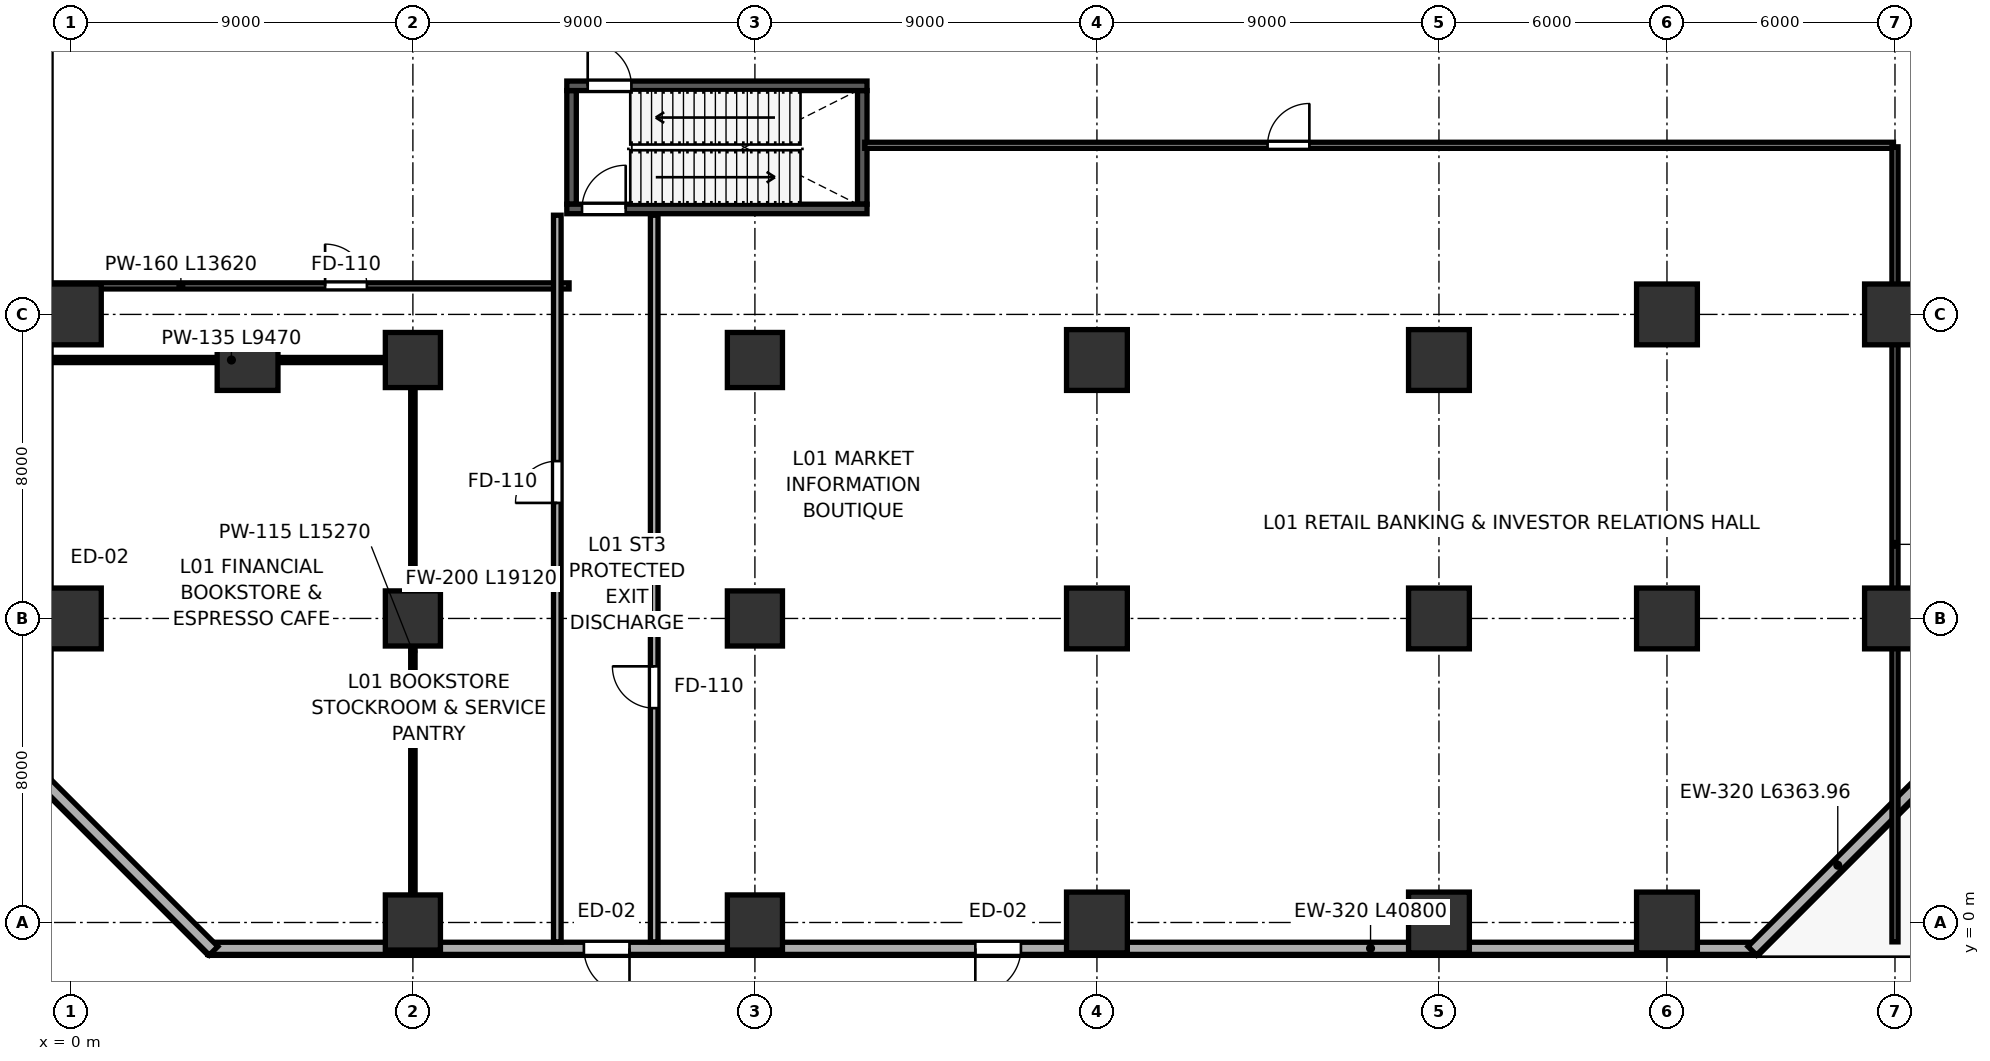
"""IFC4 building model, lengths in metres.
Left out: names, types, materials, properties, quantities, classifications, styles, units other than length and angle.
Written with IfcOpenShell. Run it as: python <this file> out.ifc"""

import sys

from ifc_helpers import new_model, si_unit, direction, frame, frame_2d, origin, origin_2d, place, context, subcontext, project, spatial, rectangle, extrude, source, transform, mapped, element, fill, save


model = new_model("IFC4")
c1 = context("Model", 3, precision=1e-05, world=origin(), true_north=direction((0.0, 1.0)))
c2 = subcontext(c1, "Body", "Model", "MODEL_VIEW")
j1 = project(units=[si_unit("LENGTHUNIT", "METRE"), si_unit("PLANEANGLEUNIT", "RADIAN")], contexts=[c1])
p1 = place(None, origin())
s1 = spatial("IfcSite", under=j1, at=p1, CompositionType="ELEMENT")
p2 = place(p1, origin())
s2 = spatial("IfcBuilding", under=s1, at=p2, CompositionType="ELEMENT")
p3 = place(p2, origin())
s3 = spatial("IfcBuildingStorey", under=s2, at=p3, CompositionType="ELEMENT", Elevation=0.0)
m1 = source(origin(), c2, "Body", "SweptSolid", [
    extrude(rectangle(XDim=1.6, YDim=1.6, at=origin_2d()), origin(), (0.0, 0.0, 1.0), 5.999),
])
for number, where, z_axis, x_axis in (
    (1, (0.0, 8.0, 0.001), (0.0, 0.0, 1.0), (1.0, 0.0, 0.0)),
    (2, (0.0, 16.0, 0.001), (0.0, 0.0, 1.0), (1.0, 0.0, 0.0)),
):
    element("IfcColumn", number, at=place(p3, frame(where, z_axis=z_axis, x_axis=x_axis)), inside=s3, PredefinedType="COLUMN", context=c2, shape_type="MappedRepresentation", body=[
        mapped(m1, transform((0.0, 0.0, 0.0), scale=1.0)),
    ])
m2 = source(origin(), c2, "Body", "SweptSolid", [
    extrude(rectangle(XDim=1.45, YDim=1.45, at=origin_2d()), origin(), (0.0, 0.0, 1.0), 5.999),
])
p4 = place(p3, frame((9.0, 0.0, 0.001), z_axis=(0.0, 0.0, 1.0), x_axis=(1.0, 0.0, 0.0)))
e3 = element("IfcColumn", 3, at=p4, inside=s3, PredefinedType="COLUMN", context=c2, shape_type="MappedRepresentation", body=[
    mapped(m2, transform((0.0, 0.0, 0.0), scale=1.0)),
])
m3 = source(origin(), c2, "Body", "SweptSolid", [
    extrude(rectangle(XDim=1.45, YDim=1.45, at=origin_2d()), origin(), (0.0, 0.0, 1.0), 5.999),
])
for number, where, z_axis, x_axis in (
    (4, (9.0, 8.0, 0.001), (0.0, 0.0, 1.0), (1.0, 0.0, 0.0)),
    (5, (9.0, 14.8, 0.001), (0.0, 0.0, 1.0), (1.0, 0.0, 0.0)),
):
    element("IfcColumn", number, at=place(p3, frame(where, z_axis=z_axis, x_axis=x_axis)), inside=s3, PredefinedType="COLUMN", context=c2, shape_type="MappedRepresentation", body=[
        mapped(m3, transform((0.0, 0.0, 0.0), scale=1.0)),
    ])
p5 = place(p3, frame((18.0, 0.0, 0.001), z_axis=(0.0, 0.0, 1.0), x_axis=(1.0, 0.0, 0.0)))
e6 = element("IfcColumn", 6, at=p5, inside=s3, PredefinedType="COLUMN", context=c2, shape_type="MappedRepresentation", body=[
    mapped(m2, transform((0.0, 0.0, 0.0), scale=1.0)),
])
for number, where, z_axis, x_axis in (
    (7, (18.0, 8.0, 0.001), (0.0, 0.0, 1.0), (1.0, 0.0, 0.0)),
    (8, (18.0, 14.8, 0.001), (0.0, 0.0, 1.0), (1.0, 0.0, 0.0)),
):
    element("IfcColumn", number, at=place(p3, frame(where, z_axis=z_axis, x_axis=x_axis)), inside=s3, PredefinedType="COLUMN", context=c2, shape_type="MappedRepresentation", body=[
        mapped(m3, transform((0.0, 0.0, 0.0), scale=1.0)),
    ])
p6 = place(p3, frame((27.0, 0.0, 0.001), z_axis=(0.0, 0.0, 1.0), x_axis=(1.0, 0.0, 0.0)))
e9 = element("IfcColumn", 9, at=p6, inside=s3, PredefinedType="COLUMN", context=c2, shape_type="MappedRepresentation", body=[
    mapped(m1, transform((0.0, 0.0, 0.0), scale=1.0)),
])
m4 = source(origin(), c2, "Body", "SweptSolid", [
    extrude(rectangle(XDim=1.6, YDim=1.6, at=origin_2d()), origin(), (0.0, 0.0, 1.0), 5.999),
])
for number, where, z_axis, x_axis in (
    (10, (27.0, 8.0, 0.001), (0.0, 0.0, 1.0), (1.0, 0.0, 0.0)),
    (11, (27.0, 14.8, 0.001), (0.0, 0.0, 1.0), (1.0, 0.0, 0.0)),
):
    element("IfcColumn", number, at=place(p3, frame(where, z_axis=z_axis, x_axis=x_axis)), inside=s3, PredefinedType="COLUMN", context=c2, shape_type="MappedRepresentation", body=[
        mapped(m4, transform((0.0, 0.0, 0.0), scale=1.0)),
    ])
p7 = place(p3, frame((36.0, 0.0, 0.001), z_axis=(0.0, 0.0, 1.0), x_axis=(1.0, 0.0, 0.0)))
e12 = element("IfcColumn", 12, at=p7, inside=s3, PredefinedType="COLUMN", context=c2, shape_type="MappedRepresentation", body=[
    mapped(m1, transform((0.0, 0.0, 0.0), scale=1.0)),
])
for number, where, z_axis, x_axis in (
    (13, (36.0, 8.0, 0.001), (0.0, 0.0, 1.0), (1.0, 0.0, 0.0)),
    (14, (36.0, 14.8, 0.001), (0.0, 0.0, 1.0), (1.0, 0.0, 0.0)),
):
    element("IfcColumn", number, at=place(p3, frame(where, z_axis=z_axis, x_axis=x_axis)), inside=s3, PredefinedType="COLUMN", context=c2, shape_type="MappedRepresentation", body=[
        mapped(m4, transform((0.0, 0.0, 0.0), scale=1.0)),
    ])
p8 = place(p3, frame((42.0, 0.0, 0.001), z_axis=(0.0, 0.0, 1.0), x_axis=(1.0, 0.0, 0.0)))
e15 = element("IfcColumn", 15, at=p8, inside=s3, PredefinedType="COLUMN", context=c2, shape_type="MappedRepresentation", body=[
    mapped(m1, transform((0.0, 0.0, 0.0), scale=1.0)),
])
for number, where, z_axis, x_axis in (
    (16, (42.0, 8.0, 0.001), (0.0, 0.0, 1.0), (1.0, 0.0, 0.0)),
    (17, (42.0, 16.0, 0.001), (0.0, 0.0, 1.0), (1.0, 0.0, 0.0)),
):
    element("IfcColumn", number, at=place(p3, frame(where, z_axis=z_axis, x_axis=x_axis)), inside=s3, PredefinedType="COLUMN", context=c2, shape_type="MappedRepresentation", body=[
        mapped(m4, transform((0.0, 0.0, 0.0), scale=1.0)),
    ])
for number, where, z_axis, x_axis in (
    (18, (48.0, 8.0, 0.001), (0.0, 0.0, 1.0), (1.0, 0.0, 0.0)),
    (19, (48.0, 16.0, 0.001), (0.0, 0.0, 1.0), (1.0, 0.0, 0.0)),
):
    element("IfcColumn", number, at=place(p3, frame(where, z_axis=z_axis, x_axis=x_axis)), inside=s3, PredefinedType="COLUMN", context=c2, shape_type="MappedRepresentation", body=[
        mapped(m1, transform((0.0, 0.0, 0.0), scale=1.0)),
    ])
p9 = place(p3, frame((4.65, 14.8, 0.001), z_axis=(0.0, 0.0, 1.0), x_axis=(1.0, 0.0, 0.0)))
e20 = element("IfcColumn", 20, at=p9, inside=s3, PredefinedType="COLUMN", context=c2, shape_type="MappedRepresentation", body=[
    mapped(m4, transform((0.0, 0.0, 0.0), scale=1.0)),
])
p10 = place(p3, frame((44.4, -0.68, 0.0), z_axis=(0.0, 0.0, 1.0), x_axis=(-1.0, 0.0, 0.0)))
e21 = element("IfcWall", 21, at=p10, inside=s3, PredefinedType="SOLIDWALL", context=c2, shape_type="SweptSolid", body=[
    extrude(rectangle(XDim=40.8, YDim=0.32, at=frame_2d((20.4, 0.0))), origin(), (0.0, 0.0, 1.0), 5.74),
])
p11 = place(p10, frame((29.7, 0.0, 0.0)))
e22 = element("IfcOpeningElement", 22, at=p11, cuts=e21, PredefinedType="OPENING", context=c2, shape_type="SweptSolid", body=[
    extrude(rectangle(XDim=1.2, YDim=2.2, at=frame_2d((0.6, 1.1))), frame((0.0, 0.17, 0.0), z_axis=(0.0, -1.0, 0.0), x_axis=(1.0, 0.0, 0.0)), (0.0, 0.0, 1.0), 0.34),
])
p12 = place(p10, frame((19.4, 0.0, 0.0)))
e23 = element("IfcOpeningElement", 23, at=p12, cuts=e21, PredefinedType="OPENING", context=c2, shape_type="SweptSolid", body=[
    extrude(rectangle(XDim=1.2, YDim=2.2, at=frame_2d((0.6, 1.1))), frame((0.0, 0.17, 0.0), z_axis=(0.0, -1.0, 0.0), x_axis=(1.0, 0.0, 0.0)), (0.0, 0.0, 1.0), 0.34),
])
for number, where, z_axis, x_axis in (
    (24, (44.244, -0.744, 0.0), (0.0, 0.0, 1.0), (0.707, 0.707, 0.0)),
    (25, (-0.744, 3.756, 0.0), (0.0, 0.0, 1.0), (0.707, -0.707, 0.0)),
):
    element("IfcWall", number, at=place(p3, frame(where, z_axis=z_axis, x_axis=x_axis)), inside=s3, PredefinedType="SOLIDWALL", context=c2, shape_type="SweptSolid", body=[
        extrude(rectangle(XDim=6.364, YDim=0.32, at=frame_2d((3.182, 0.0))), origin(), (0.0, 0.0, 1.0), 5.74),
    ])
for number, where, z_axis, x_axis in (
    (26, (13.175, 18.9, 0.0), (0.0, 0.0, 1.0), (0.0, 1.0, 0.0)),
    (27, (20.825, 18.9, 0.0), (0.0, 0.0, 1.0), (0.0, 1.0, 0.0)),
):
    element("IfcWall", number, at=place(p3, frame(where, z_axis=z_axis, x_axis=x_axis)), inside=s3, PredefinedType="SHEAR", context=c2, shape_type="SweptSolid", body=[
        extrude(rectangle(XDim=2.99, YDim=0.25, at=frame_2d((1.495, 0.0))), origin(), (0.0, 0.0, 1.0), 5.74),
    ])
p13 = place(p3, frame((13.05, 18.775, 0.0), z_axis=(0.0, 0.0, 1.0), x_axis=(1.0, 0.0, 0.0)))
e28 = element("IfcWall", 28, at=p13, inside=s3, PredefinedType="SHEAR", context=c2, shape_type="SweptSolid", body=[
    extrude(rectangle(XDim=7.9, YDim=0.25, at=frame_2d((3.95, 0.0))), origin(), (0.0, 0.0, 1.0), 5.74),
])
p14 = place(p13, frame((0.4, 0.0, 0.0)))
e29 = element("IfcOpeningElement", 29, at=p14, cuts=e28, PredefinedType="OPENING", context=c2, shape_type="SweptSolid", body=[
    extrude(rectangle(XDim=1.15, YDim=2.2, at=frame_2d((0.575, 1.1))), frame((0.0, 0.135, 0.0), z_axis=(0.0, -1.0, 0.0), x_axis=(1.0, 0.0, 0.0)), (0.0, 0.0, 1.0), 0.27),
])
p15 = place(p3, frame((13.05, 22.015, 0.0), z_axis=(0.0, 0.0, 1.0), x_axis=(1.0, 0.0, 0.0)))
e30 = element("IfcWall", 30, at=p15, inside=s3, PredefinedType="SHEAR", context=c2, shape_type="SweptSolid", body=[
    extrude(rectangle(XDim=7.9, YDim=0.25, at=frame_2d((3.95, 0.0))), origin(), (0.0, 0.0, 1.0), 5.74),
])
p16 = place(p15, frame((0.55, 0.0, 0.0)))
e31 = element("IfcOpeningElement", 31, at=p16, cuts=e30, PredefinedType="OPENING", context=c2, shape_type="SweptSolid", body=[
    extrude(rectangle(XDim=1.15, YDim=2.2, at=frame_2d((0.575, 1.1))), frame((0.0, 0.135, 0.0), z_axis=(0.0, -1.0, 0.0), x_axis=(1.0, 0.0, 0.0)), (0.0, 0.0, 1.0), 0.27),
])
p17 = place(p3, frame((-0.51, 16.75, 0.0), z_axis=(0.0, 0.0, 1.0), x_axis=(1.0, 0.0, 0.0)))
e32 = element("IfcWall", 32, at=p17, inside=s3, PredefinedType="PARTITIONING", context=c2, shape_type="SweptSolid", body=[
    extrude(rectangle(XDim=13.62, YDim=0.16, at=frame_2d((6.81, 0.0))), origin(), (0.0, 0.0, 1.0), 4.869),
])
p18 = place(p17, frame((7.2, 0.0, 0.0)))
e33 = element("IfcOpeningElement", 33, at=p18, cuts=e32, PredefinedType="OPENING", context=c2, shape_type="SweptSolid", body=[
    extrude(rectangle(XDim=1.1, YDim=2.2, at=frame_2d((0.55, 1.1))), frame((0.0, 0.09, 0.0), z_axis=(0.0, -1.0, 0.0), x_axis=(1.0, 0.0, 0.0)), (0.0, 0.0, 1.0), 0.18),
])
p19 = place(p3, frame((20.89, 20.45, 0.0), z_axis=(0.0, 0.0, 1.0), x_axis=(1.0, 0.0, 0.0)))
e34 = element("IfcWall", 34, at=p19, inside=s3, PredefinedType="PARTITIONING", context=c2, shape_type="SweptSolid", body=[
    extrude(rectangle(XDim=27.07, YDim=0.16, at=frame_2d((13.535, 0.0))), origin(), (0.0, 0.0, 1.0), 4.869),
])
p20 = place(p19, frame((10.6, 0.0, 0.0)))
e35 = element("IfcOpeningElement", 35, at=p20, cuts=e34, PredefinedType="OPENING", context=c2, shape_type="SweptSolid", body=[
    extrude(rectangle(XDim=1.1, YDim=2.2, at=frame_2d((0.55, 1.1))), frame((0.0, 0.09, 0.0), z_axis=(0.0, -1.0, 0.0), x_axis=(1.0, 0.0, 0.0)), (0.0, 0.0, 1.0), 0.18),
])
p21 = place(p3, frame((48.0, -0.51, 0.0), z_axis=(0.0, 0.0, 1.0), x_axis=(0.0, 1.0, 0.0)))
e36 = element("IfcWall", 36, at=p21, inside=s3, PredefinedType="PARTITIONING", context=c2, shape_type="SweptSolid", body=[
    extrude(rectangle(XDim=20.92, YDim=0.16, at=frame_2d((10.46, 0.0))), origin(), (0.0, 0.0, 1.0), 4.875),
])
p22 = place(p3, frame((-0.51, 14.8, 0.0), z_axis=(0.0, 0.0, 1.0), x_axis=(1.0, 0.0, 0.0)))
e37 = element("IfcWall", 37, at=p22, inside=s3, PredefinedType="PARTITIONING", context=c2, shape_type="SweptSolid", body=[
    extrude(rectangle(XDim=9.47, YDim=0.135, at=frame_2d((4.735, 0.0))), origin(), (0.0, 0.0, 1.0), 2.5),
])
p23 = place(p3, frame((9.0, -0.51, 0.0), z_axis=(0.0, 0.0, 1.0), x_axis=(0.0, 1.0, 0.0)))
e38 = element("IfcWall", 38, at=p23, inside=s3, PredefinedType="PARTITIONING", context=c2, shape_type="SweptSolid", body=[
    extrude(rectangle(XDim=15.27, YDim=0.115, at=frame_2d((7.635, 0.0))), origin(), (0.0, 0.0, 1.0), 2.5),
])
p24 = place(p3, frame((12.8, -0.51, 0.0), z_axis=(0.0, 0.0, 1.0), x_axis=(0.0, 1.0, 0.0)))
e39 = element("IfcWall", 39, at=p24, inside=s3, PredefinedType="SOLIDWALL", context=c2, shape_type="SweptSolid", body=[
    extrude(rectangle(XDim=19.12, YDim=0.2, at=frame_2d((9.56, 0.0))), origin(), (0.0, 0.0, 1.0), 4.869),
])
p25 = place(p24, frame((11.55, 0.0, 0.0)))
e40 = element("IfcOpeningElement", 40, at=p25, cuts=e39, PredefinedType="OPENING", context=c2, shape_type="SweptSolid", body=[
    extrude(rectangle(XDim=1.1, YDim=2.2, at=frame_2d((0.55, 1.1))), frame((0.0, 0.11, 0.0), z_axis=(0.0, -1.0, 0.0), x_axis=(1.0, 0.0, 0.0)), (0.0, 0.0, 1.0), 0.22),
])
p26 = place(p3, frame((15.35, -0.51, 0.0), z_axis=(0.0, 0.0, 1.0), x_axis=(0.0, 1.0, 0.0)))
e41 = element("IfcWall", 41, at=p26, inside=s3, PredefinedType="SOLIDWALL", context=c2, shape_type="SweptSolid", body=[
    extrude(rectangle(XDim=19.12, YDim=0.2, at=frame_2d((9.56, 0.0))), origin(), (0.0, 0.0, 1.0), 4.869),
])
p27 = place(p26, frame((6.15, 0.0, 0.0)))
e42 = element("IfcOpeningElement", 42, at=p27, cuts=e41, PredefinedType="OPENING", context=c2, shape_type="SweptSolid", body=[
    extrude(rectangle(XDim=1.1, YDim=2.2, at=frame_2d((0.55, 1.1))), frame((0.0, 0.11, 0.0), z_axis=(0.0, -1.0, 0.0), x_axis=(1.0, 0.0, 0.0)), (0.0, 0.0, 1.0), 0.22),
])
m5 = source(origin(), c2, "Body", "SweptSolid", [
    extrude(rectangle(XDim=1.2, YDim=2.2, at=frame_2d((0.6, 1.1))), frame((0.0, 0.025, 0.0), z_axis=(0.0, -1.0, 0.0), x_axis=(1.0, 0.0, 0.0)), (0.0, 0.0, 1.0), 0.05),
])
p28 = place(p11, origin())
e43 = element("IfcDoor", 43, at=p28, inside=s3, OperationType="SINGLE_SWING_LEFT", PredefinedType="DOOR", context=c2, shape_type="MappedRepresentation", body=[
    mapped(m5, transform((0.0, 0.0, 0.0), scale=1.0)),
])
fill(e22, e43)
p29 = place(p12, origin())
e44 = element("IfcDoor", 44, at=p29, inside=s3, OperationType="SINGLE_SWING_RIGHT", PredefinedType="DOOR", context=c2, shape_type="MappedRepresentation", body=[
    mapped(m5, transform((0.0, 0.0, 0.0), scale=1.0)),
])
fill(e23, e44)
m6 = source(origin(), c2, "Body", "SweptSolid", [
    extrude(rectangle(XDim=1.15, YDim=2.2, at=frame_2d((0.575, 1.1))), frame((0.0, 0.025, 0.0), z_axis=(0.0, -1.0, 0.0), x_axis=(1.0, 0.0, 0.0)), (0.0, 0.0, 1.0), 0.05),
])
p30 = place(p16, origin())
e45 = element("IfcDoor", 45, at=p30, inside=s3, OperationType="SINGLE_SWING_LEFT", PredefinedType="DOOR", context=c2, shape_type="MappedRepresentation", body=[
    mapped(m6, transform((0.0, 0.0, 0.0), scale=1.0)),
])
fill(e31, e45)
p31 = place(p14, origin())
e46 = element("IfcDoor", 46, at=p31, inside=s3, OperationType="SINGLE_SWING_RIGHT", PredefinedType="DOOR", context=c2, shape_type="MappedRepresentation", body=[
    mapped(m6, transform((0.0, 0.0, 0.0), scale=1.0)),
])
fill(e29, e46)
m7 = source(origin(), c2, "Body", "SweptSolid", [
    extrude(rectangle(XDim=1.1, YDim=2.2, at=frame_2d((0.55, 1.1))), frame((0.0, 0.025, 0.0), z_axis=(0.0, -1.0, 0.0), x_axis=(1.0, 0.0, 0.0)), (0.0, 0.0, 1.0), 0.05),
])
p32 = place(p18, origin())
e47 = element("IfcDoor", 47, at=p32, inside=s3, OperationType="SINGLE_SWING_LEFT", PredefinedType="DOOR", context=c2, shape_type="MappedRepresentation", body=[
    mapped(m7, transform((0.0, 0.0, 0.0), scale=1.0)),
])
fill(e33, e47)
p33 = place(p20, origin())
e48 = element("IfcDoor", 48, at=p33, inside=s3, OperationType="SINGLE_SWING_RIGHT", PredefinedType="DOOR", context=c2, shape_type="MappedRepresentation", body=[
    mapped(m7, transform((0.0, 0.0, 0.0), scale=1.0)),
])
fill(e35, e48)
p34 = place(p25, origin())
e49 = element("IfcDoor", 49, at=p34, inside=s3, OperationType="SINGLE_SWING_LEFT", PredefinedType="DOOR", context=c2, shape_type="MappedRepresentation", body=[
    mapped(m7, transform((0.0, 0.0, 0.0), scale=1.0)),
])
fill(e40, e49)
p35 = place(p27, origin())
e50 = element("IfcDoor", 50, at=p35, inside=s3, OperationType="SINGLE_SWING_RIGHT", PredefinedType="DOOR", context=c2, shape_type="MappedRepresentation", body=[
    mapped(m7, transform((0.0, 0.0, 0.0), scale=1.0)),
])
fill(e42, e50)
save(model, sys.argv[1])
